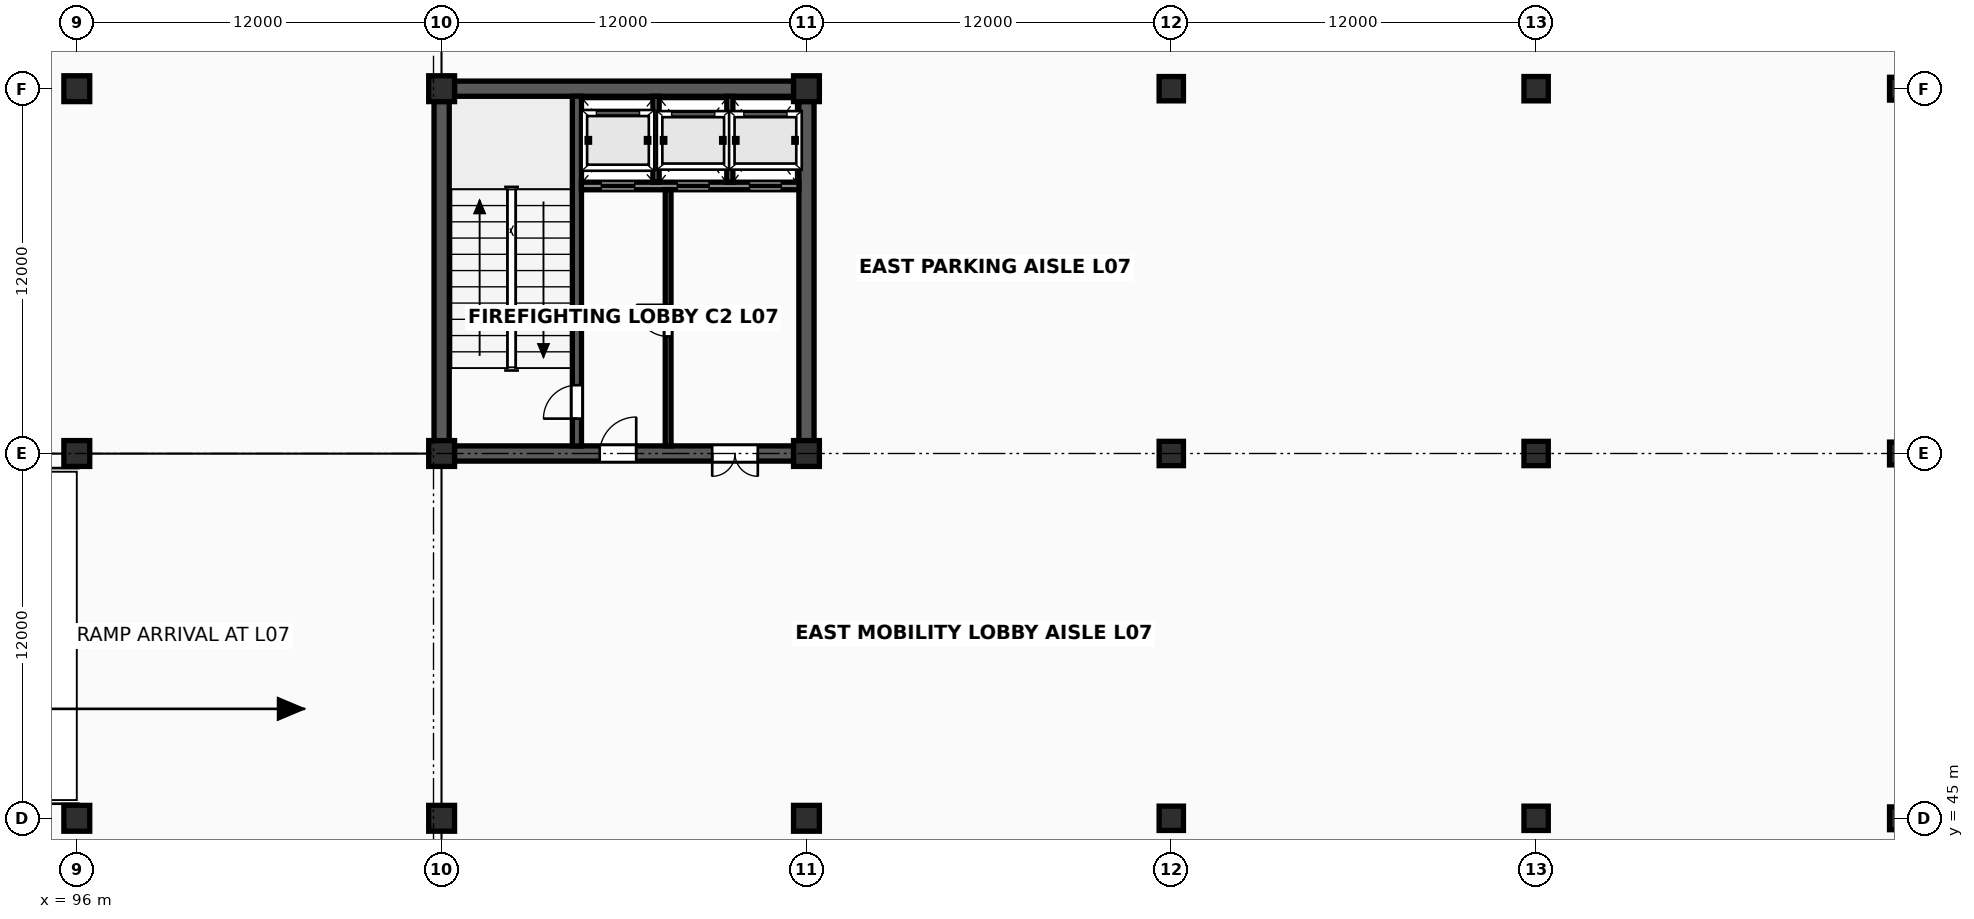
"""IFC4 building model, lengths in metres.
Left out: names, types, materials, properties, quantities, classifications, styles, units other than length and angle.
Written with IfcOpenShell. Run it as: python <this file> out.ifc"""

import sys

from ifc_helpers import new_model, si_unit, direction, frame, frame_2d, origin, origin_2d, place, context, subcontext, project, spatial, rectangle, extrude, element, fill, save


model = new_model("IFC4")
c1 = context("Model", 3, precision=1e-05, world=origin(), true_north=direction((0.0, 1.0)))
c2 = subcontext(c1, "Body", "Model", "MODEL_VIEW")
j1 = project(units=[si_unit("LENGTHUNIT", "METRE"), si_unit("PLANEANGLEUNIT", "RADIAN")], contexts=[c1])
p1 = place(None, origin())
s1 = spatial("IfcSite", under=j1, at=p1, CompositionType="ELEMENT")
p2 = place(p1, origin())
s2 = spatial("IfcBuilding", under=s1, at=p2, CompositionType="ELEMENT")
p3 = place(p2, frame((0.0, 0.0, 28.6)))
s3 = spatial("IfcBuildingStorey", under=s2, at=p3, CompositionType="ELEMENT", Elevation=28.6)
for number, where, z_axis, x_axis in (
    (1, (96.0, 45.0, 0.0), (0.0, 0.0, 1.0), (1.0, 0.0, 0.0)),
    (2, (96.0, 57.0, 0.0), (0.0, 0.0, 1.0), (1.0, 0.0, 0.0)),
    (3, (96.0, 69.0, 0.0), (0.0, 0.0, 1.0), (1.0, 0.0, 0.0)),
    (4, (108.0, 45.0, 0.0), (0.0, 0.0, 1.0), (1.0, 0.0, 0.0)),
    (5, (108.0, 57.0, 0.0), (0.0, 0.0, 1.0), (1.0, 0.0, 0.0)),
    (6, (108.0, 69.0, 0.0), (0.0, 0.0, 1.0), (1.0, 0.0, 0.0)),
    (7, (120.0, 45.0, 0.0), (0.0, 0.0, 1.0), (1.0, 0.0, 0.0)),
    (8, (120.0, 57.0, 0.0), (0.0, 0.0, 1.0), (1.0, 0.0, 0.0)),
    (9, (120.0, 69.0, 0.0), (0.0, 0.0, 1.0), (1.0, 0.0, 0.0)),
):
    element("IfcColumn", number, at=place(p3, frame(where, z_axis=z_axis, x_axis=x_axis)), inside=s3, PredefinedType="COLUMN", context=c2, shape_type="SweptSolid", body=[
        extrude(rectangle(XDim=0.85, YDim=0.85, at=origin_2d()), origin(), (0.0, 0.0, 1.0), 3.8),
    ])
for number, where, z_axis, x_axis in (
    (10, (132.0, 45.0, 0.0), (0.0, 0.0, 1.0), (1.0, 0.0, 0.0)),
    (11, (132.0, 57.0, 0.0), (0.0, 0.0, 1.0), (1.0, 0.0, 0.0)),
    (12, (132.0, 69.0, 0.0), (0.0, 0.0, 1.0), (1.0, 0.0, 0.0)),
    (13, (144.0, 45.0, 0.0), (0.0, 0.0, 1.0), (1.0, 0.0, 0.0)),
    (14, (144.0, 57.0, 0.0), (0.0, 0.0, 1.0), (1.0, 0.0, 0.0)),
    (15, (144.0, 69.0, 0.0), (0.0, 0.0, 1.0), (1.0, 0.0, 0.0)),
):
    element("IfcColumn", number, at=place(p3, frame(where, z_axis=z_axis, x_axis=x_axis)), inside=s3, PredefinedType="COLUMN", context=c2, shape_type="SweptSolid", body=[
        extrude(rectangle(XDim=0.8, YDim=0.8, at=origin_2d()), origin(), (0.0, 0.0, 1.0), 3.8),
    ])
for number, where, z_axis, x_axis in (
    (16, (156.0, 45.0, 0.0), (0.0, 0.0, 1.0), (1.0, 0.0, 0.0)),
    (17, (156.0, 57.0, 0.0), (0.0, 0.0, 1.0), (1.0, 0.0, 0.0)),
    (18, (156.0, 69.0, 0.0), (0.0, 0.0, 1.0), (1.0, 0.0, 0.0)),
):
    element("IfcColumn", number, at=place(p3, frame(where, z_axis=z_axis, x_axis=x_axis)), inside=s3, PredefinedType="COLUMN", context=c2, shape_type="SweptSolid", body=[
        extrude(rectangle(XDim=0.75, YDim=0.75, at=origin_2d()), origin(), (0.0, 0.0, 1.0), 3.8),
    ])
p4 = place(p3, frame((108.422, 57.0, 0.0), z_axis=(0.0, 0.0, 1.0), x_axis=(1.0, 0.0, 0.0)))
e19 = element("IfcWall", 19, at=p4, inside=s3, PredefinedType="SHEAR", context=c2, shape_type="SweptSolid", body=[
    extrude(rectangle(XDim=11.156, YDim=0.5, at=frame_2d((5.578, 0.0))), origin(), (0.0, 0.0, 1.0), 3.553),
])
p5 = place(p4, frame((4.778, 0.0, 0.0)))
e20 = element("IfcOpeningElement", 20, at=p5, cuts=e19, PredefinedType="OPENING", context=c2, shape_type="SweptSolid", body=[
    extrude(rectangle(XDim=1.2, YDim=2.2, at=frame_2d((0.6, 1.1))), frame((0.0, 0.265, 0.0), z_axis=(0.0, -1.0, 0.0), x_axis=(1.0, 0.0, 0.0)), (0.0, 0.0, 1.0), 0.53),
])
p6 = place(p4, frame((8.478, 0.0, 0.0)))
e21 = element("IfcOpeningElement", 21, at=p6, cuts=e19, PredefinedType="OPENING", context=c2, shape_type="SweptSolid", body=[
    extrude(rectangle(XDim=1.5, YDim=2.25, at=frame_2d((0.75, 1.125))), frame((0.0, 0.265, 0.0), z_axis=(0.0, -1.0, 0.0), x_axis=(1.0, 0.0, 0.0)), (0.0, 0.0, 1.0), 0.53),
])
for number, where, z_axis, x_axis in (
    (22, (108.422, 69.0, 0.0), (0.0, 0.0, 1.0), (1.0, 0.0, 0.0)),
    (23, (108.0, 57.422, 0.0), (0.0, 0.0, 1.0), (0.0, 1.0, 0.0)),
    (24, (120.0, 57.422, 0.0), (0.0, 0.0, 1.0), (0.0, 1.0, 0.0)),
):
    element("IfcWall", number, at=place(p3, frame(where, z_axis=z_axis, x_axis=x_axis)), inside=s3, PredefinedType="SHEAR", context=c2, shape_type="SweptSolid", body=[
        extrude(rectangle(XDim=11.156, YDim=0.5, at=frame_2d((5.578, 0.0))), origin(), (0.0, 0.0, 1.0), 3.553),
    ])
p7 = place(p3, frame((112.45, 57.247, 0.0), z_axis=(0.0, 0.0, 1.0), x_axis=(0.0, 1.0, 0.0)))
e25 = element("IfcWall", 25, at=p7, inside=s3, PredefinedType="SHEAR", context=c2, shape_type="SweptSolid", body=[
    extrude(rectangle(XDim=11.506, YDim=0.3, at=frame_2d((5.753, 0.0))), origin(), (0.0, 0.0, 1.0), 3.553),
])
p8 = place(p7, frame((0.9, 0.0, 0.0)))
e26 = element("IfcOpeningElement", 26, at=p8, cuts=e25, PredefinedType="OPENING", context=c2, shape_type="SweptSolid", body=[
    extrude(rectangle(XDim=1.1, YDim=2.2, at=frame_2d((0.55, 1.1))), frame((0.0, 0.165, 0.0), z_axis=(0.0, -1.0, 0.0), x_axis=(1.0, 0.0, 0.0)), (0.0, 0.0, 1.0), 0.33),
])
p9 = place(p3, frame((112.597, 65.8, 0.0), z_axis=(0.0, 0.0, 1.0), x_axis=(1.0, 0.0, 0.0)))
e27 = element("IfcWall", 27, at=p9, inside=s3, PredefinedType="SOLIDWALL", context=c2, shape_type="SweptSolid", body=[
    extrude(rectangle(XDim=7.156, YDim=0.25, at=frame_2d((3.578, 0.0))), origin(), (0.0, 0.0, 1.0), 3.553),
])
p10 = place(p9, frame((0.653, 0.0, 0.0)))
e28 = element("IfcOpeningElement", 28, at=p10, cuts=e27, PredefinedType="OPENING", context=c2, shape_type="SweptSolid", body=[
    extrude(rectangle(XDim=1.1, YDim=2.24, at=frame_2d((0.55, 1.12))), frame((0.0, 0.14, 0.0), z_axis=(0.0, -1.0, 0.0), x_axis=(1.0, 0.0, 0.0)), (0.0, 0.0, 1.0), 0.28),
])
p11 = place(p9, frame((3.153, 0.0, 0.0)))
e29 = element("IfcOpeningElement", 29, at=p11, cuts=e27, PredefinedType="OPENING", context=c2, shape_type="SweptSolid", body=[
    extrude(rectangle(XDim=1.05, YDim=2.2, at=frame_2d((0.525, 1.1))), frame((0.0, 0.14, 0.0), z_axis=(0.0, -1.0, 0.0), x_axis=(1.0, 0.0, 0.0)), (0.0, 0.0, 1.0), 0.28),
])
p12 = place(p9, frame((5.528, 0.0, 0.0)))
e30 = element("IfcOpeningElement", 30, at=p12, cuts=e27, PredefinedType="OPENING", context=c2, shape_type="SweptSolid", body=[
    extrude(rectangle(XDim=1.05, YDim=2.2, at=frame_2d((0.525, 1.1))), frame((0.0, 0.14, 0.0), z_axis=(0.0, -1.0, 0.0), x_axis=(1.0, 0.0, 0.0)), (0.0, 0.0, 1.0), 0.28),
])
for number, where, z_axis, x_axis in (
    (31, (115.05, 65.92, 0.0), (0.0, 0.0, 1.0), (0.0, 1.0, 0.0)),
    (32, (117.48, 65.92, 0.0), (0.0, 0.0, 1.0), (0.0, 1.0, 0.0)),
):
    element("IfcWall", number, at=place(p3, frame(where, z_axis=z_axis, x_axis=x_axis)), inside=s3, PredefinedType="SOLIDWALL", context=c2, shape_type="SweptSolid", body=[
        extrude(rectangle(XDim=2.83, YDim=0.2, at=frame_2d((1.415, 0.0))), origin(), (0.0, 0.0, 1.0), 3.543),
    ])
p13 = place(p3, frame((115.45, 57.25, 0.0), z_axis=(0.0, 0.0, 1.0), x_axis=(0.0, 1.0, 0.0)))
e33 = element("IfcWall", 33, at=p13, inside=s3, PredefinedType="SOLIDWALL", context=c2, shape_type="SweptSolid", body=[
    extrude(rectangle(XDim=8.43, YDim=0.19, at=frame_2d((4.215, 0.0))), origin(), (0.0, 0.0, 1.0), 3.543),
])
p14 = place(p13, frame((3.6, 0.0, 0.0)))
e34 = element("IfcOpeningElement", 34, at=p14, cuts=e33, PredefinedType="OPENING", context=c2, shape_type="SweptSolid", body=[
    extrude(rectangle(XDim=1.04, YDim=2.18, at=frame_2d((0.52, 1.09))), frame((0.0, 0.11, 0.0), z_axis=(0.0, -1.0, 0.0), x_axis=(1.0, 0.0, 0.0)), (0.0, 0.0, 1.0), 0.22),
])
p15 = place(p8, origin())
e35 = element("IfcDoor", 35, at=p15, inside=s3, OperationType="SINGLE_SWING_LEFT", PredefinedType="DOOR", context=c2, shape_type="SweptSolid", body=[
    extrude(rectangle(XDim=1.1, YDim=2.2, at=frame_2d((0.55, 1.1))), frame((0.0, 0.025, 0.0), z_axis=(0.0, -1.0, 0.0), x_axis=(1.0, 0.0, 0.0)), (0.0, 0.0, 1.0), 0.05),
])
fill(e26, e35)
p16 = place(p14, origin())
e36 = element("IfcDoor", 36, at=p16, inside=s3, OperationType="SINGLE_SWING_RIGHT", PredefinedType="DOOR", context=c2, shape_type="SweptSolid", body=[
    extrude(rectangle(XDim=1.04, YDim=2.18, at=frame_2d((0.52, 1.09))), frame((0.0, 0.025, 0.0), z_axis=(0.0, -1.0, 0.0), x_axis=(1.0, 0.0, 0.0)), (0.0, 0.0, 1.0), 0.05),
])
fill(e34, e36)
p17 = place(p5, origin())
e37 = element("IfcDoor", 37, at=p17, inside=s3, OperationType="SINGLE_SWING_RIGHT", PredefinedType="DOOR", context=c2, shape_type="SweptSolid", body=[
    extrude(rectangle(XDim=1.2, YDim=2.2, at=frame_2d((0.6, 1.1))), frame((0.0, 0.025, 0.0), z_axis=(0.0, -1.0, 0.0), x_axis=(1.0, 0.0, 0.0)), (0.0, 0.0, 1.0), 0.05),
])
fill(e20, e37)
p18 = place(p6, origin())
e38 = element("IfcDoor", 38, at=p18, inside=s3, OperationType="DOUBLE_DOOR_SINGLE_SWING", PredefinedType="DOOR", context=c2, shape_type="SweptSolid", body=[
    extrude(rectangle(XDim=1.5, YDim=2.25, at=frame_2d((0.75, 1.125))), frame((0.0, 0.025, 0.0), z_axis=(0.0, -1.0, 0.0), x_axis=(1.0, 0.0, 0.0)), (0.0, 0.0, 1.0), 0.05),
])
fill(e21, e38)
p19 = place(p10, origin())
e39 = element("IfcDoor", 39, at=p19, inside=s3, OperationType="SLIDING_TO_LEFT", PredefinedType="USERDEFINED", context=c2, shape_type="SweptSolid", body=[
    extrude(rectangle(XDim=1.1, YDim=2.24, at=frame_2d((0.55, 1.12))), frame((0.0, 0.025, 0.0), z_axis=(0.0, -1.0, 0.0), x_axis=(1.0, 0.0, 0.0)), (0.0, 0.0, 1.0), 0.05),
])
fill(e28, e39)
p20 = place(p11, origin())
e40 = element("IfcDoor", 40, at=p20, inside=s3, OperationType="SLIDING_TO_LEFT", PredefinedType="USERDEFINED", context=c2, shape_type="SweptSolid", body=[
    extrude(rectangle(XDim=1.05, YDim=2.2, at=frame_2d((0.525, 1.1))), frame((0.0, 0.025, 0.0), z_axis=(0.0, -1.0, 0.0), x_axis=(1.0, 0.0, 0.0)), (0.0, 0.0, 1.0), 0.05),
])
fill(e29, e40)
p21 = place(p12, origin())
e41 = element("IfcDoor", 41, at=p21, inside=s3, OperationType="SLIDING_TO_LEFT", PredefinedType="USERDEFINED", context=c2, shape_type="SweptSolid", body=[
    extrude(rectangle(XDim=1.05, YDim=2.2, at=frame_2d((0.525, 1.1))), frame((0.0, 0.025, 0.0), z_axis=(0.0, -1.0, 0.0), x_axis=(1.0, 0.0, 0.0)), (0.0, 0.0, 1.0), 0.05),
])
fill(e30, e41)
save(model, sys.argv[1])
